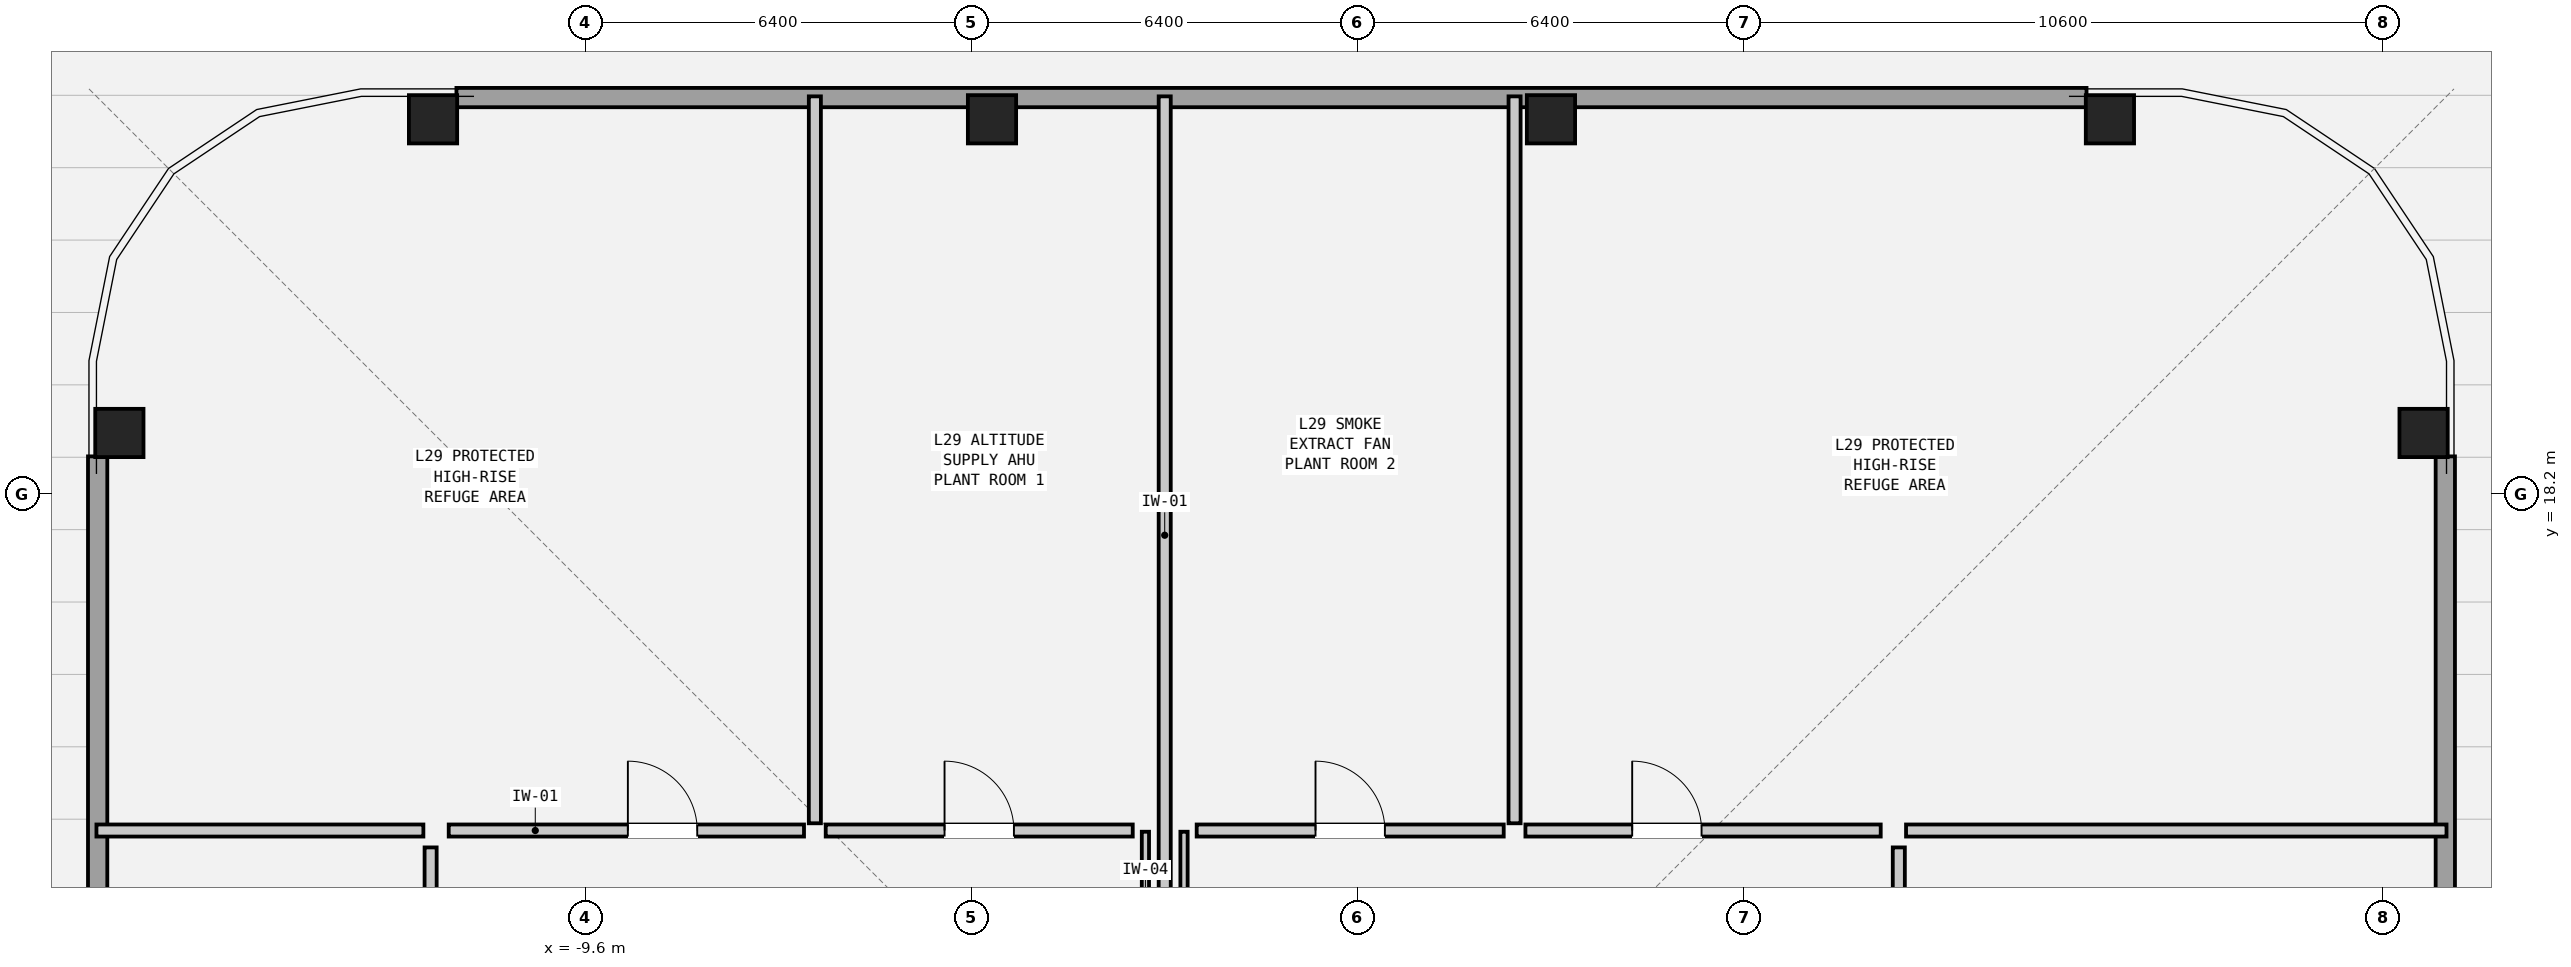
"""IFC4 building model, lengths in metres.
Left out: names, types, materials, properties, quantities, classifications, styles, units other than length and angle.
Written with IfcOpenShell. Run it as: python <this file> out.ifc"""

import sys

from ifc_helpers import new_model, si_unit, direction, frame, frame_2d, origin, origin_2d, place, context, subcontext, project, spatial, rectangle, hollow_rectangle, extrude, element, fill, save


model = new_model("IFC4")
c1 = context("Model", 3, precision=1e-05, world=origin(), true_north=direction((0.0, 1.0)))
c2 = subcontext(c1, "Body", "Model", "MODEL_VIEW")
j1 = project(units=[si_unit("LENGTHUNIT", "METRE"), si_unit("PLANEANGLEUNIT", "RADIAN")], contexts=[c1])
p1 = place(None, origin())
s1 = spatial("IfcSite", under=j1, at=p1, CompositionType="ELEMENT")
p2 = place(p1, origin())
s2 = spatial("IfcBuilding", under=s1, at=p2, CompositionType="ELEMENT")
p3 = place(p2, frame((0.0, 0.0, 101.25)))
s3 = spatial("IfcBuildingStorey", under=s2, at=p3, CompositionType="ELEMENT", Elevation=101.25)
for number, where, z_axis, x_axis in (
    (1, (20.87, 19.21, 0.0), (0.0, 0.0, 1.0), (0.0, 1.0, 0.0)),
    (2, (15.67, 24.41, 0.0), (0.0, 0.0, 1.0), (1.0, 0.0, 0.0)),
    (3, (6.403, 24.41, 0.0), (0.0, 0.0, 1.0), (1.0, 0.0, 0.0)),
    (4, (-2.863, 24.41, 0.0), (0.0, 0.0, 1.0), (1.0, 0.0, 0.0)),
    (5, (-12.13, 24.41, 0.0), (0.0, 0.0, 1.0), (1.0, 0.0, 0.0)),
    (6, (-17.33, 19.21, 0.0), (0.0, 0.0, 1.0), (0.0, 1.0, 0.0)),
):
    element("IfcColumn", number, at=place(p3, frame(where, z_axis=z_axis, x_axis=x_axis)), inside=s3, PredefinedType="COLUMN", context=c2, shape_type="SweptSolid", body=[
        extrude(hollow_rectangle(XDim=0.8, YDim=0.8, WallThickness=0.05, at=origin_2d()), origin(), (0.0, 0.0, 1.0), 3.6),
    ])
for number, where, z_axis, x_axis in (
    (7, (21.23, 18.822, 0.0), (0.0, 0.0, 1.0), (0.0, -1.0, 0.0)),
    (8, (-11.742, 24.77, 0.0), (0.0, 0.0, 1.0), (1.0, 0.0, 0.0)),
    (9, (-17.69, -8.202, 0.0), (0.0, 0.0, 1.0), (0.0, 1.0, 0.0)),
):
    element("IfcWall", number, at=place(p3, frame(where, z_axis=z_axis, x_axis=x_axis)), inside=s3, PredefinedType="SOLIDWALL", context=c2, shape_type="SweptSolid", body=[
        extrude(rectangle(XDim=27.024, YDim=0.32, at=frame_2d((13.512, 0.0))), origin(), (0.0, 0.0, 1.0), 2.082),
    ])
p4 = place(p3, frame((0.0, 10.24, 0.0), z_axis=(0.0, 0.0, 1.0), x_axis=(0.0, 1.0, 0.0)))
e10 = element("IfcWall", 10, at=p4, inside=s3, PredefinedType="PARTITIONING", context=c2, shape_type="SweptSolid", body=[
    extrude(rectangle(XDim=14.55, YDim=0.2, at=frame_2d((7.275, 0.0))), origin(), (0.0, 0.0, 1.0), 2.741),
])
for number, where, z_axis, x_axis in (
    (11, (-0.32, 10.24, 0.0), (0.0, 0.0, 1.0), (0.0, 1.0, 0.0)),
    (12, (0.32, 10.24, 0.0), (0.0, 0.0, 1.0), (0.0, 1.0, 0.0)),
):
    element("IfcWall", number, at=place(p3, frame(where, z_axis=z_axis, x_axis=x_axis)), inside=s3, PredefinedType="PARTITIONING", context=c2, shape_type="SweptSolid", body=[
        extrude(rectangle(XDim=2.36, YDim=0.12, at=frame_2d((1.18, 0.0))), origin(), (0.0, 0.0, 1.0), 2.741),
    ])
p5 = place(p3, frame((-11.87, 12.62, 0.0), z_axis=(0.0, 0.0, 1.0), x_axis=(1.0, 0.0, 0.0)))
e13 = element("IfcWall", 13, at=p5, inside=s3, PredefinedType="PARTITIONING", context=c2, shape_type="SweptSolid", body=[
    extrude(rectangle(XDim=5.89, YDim=0.2, at=frame_2d((2.945, 0.0))), origin(), (0.0, 0.0, 1.0), 3.22),
])
p6 = place(p5, frame((2.97, 0.0, 0.0)))
e14 = element("IfcOpeningElement", 14, at=p6, cuts=e13, PredefinedType="OPENING", context=c2, shape_type="SweptSolid", body=[
    extrude(rectangle(XDim=1.15, YDim=2.1, at=frame_2d((0.575, 1.05))), frame((0.0, 0.112, 0.0), z_axis=(0.0, -1.0, 0.0), x_axis=(1.0, 0.0, 0.0)), (0.0, 0.0, 1.0), 0.224),
])
p7 = place(p3, frame((-5.8, 12.74, 0.0), z_axis=(0.0, 0.0, 1.0), x_axis=(0.0, 1.0, 0.0)))
e15 = element("IfcWall", 15, at=p7, inside=s3, PredefinedType="PARTITIONING", context=c2, shape_type="SweptSolid", body=[
    extrude(rectangle(XDim=12.05, YDim=0.2, at=frame_2d((6.025, 0.0))), origin(), (0.0, 0.0, 1.0), 2.741),
])
p8 = place(p3, frame((-5.62, 12.62, 0.0), z_axis=(0.0, 0.0, 1.0), x_axis=(1.0, 0.0, 0.0)))
e16 = element("IfcWall", 16, at=p8, inside=s3, PredefinedType="PARTITIONING", context=c2, shape_type="SweptSolid", body=[
    extrude(rectangle(XDim=5.09, YDim=0.2, at=frame_2d((2.545, 0.0))), origin(), (0.0, 0.0, 1.0), 3.22),
])
p9 = place(p8, frame((1.97, 0.0, 0.0)))
e17 = element("IfcOpeningElement", 17, at=p9, cuts=e16, PredefinedType="OPENING", context=c2, shape_type="SweptSolid", body=[
    extrude(rectangle(XDim=1.15, YDim=2.1, at=frame_2d((0.575, 1.05))), frame((0.0, 0.112, 0.0), z_axis=(0.0, -1.0, 0.0), x_axis=(1.0, 0.0, 0.0)), (0.0, 0.0, 1.0), 0.224),
])
p10 = place(p3, frame((0.53, 12.62, 0.0), z_axis=(0.0, 0.0, 1.0), x_axis=(1.0, 0.0, 0.0)))
e18 = element("IfcWall", 18, at=p10, inside=s3, PredefinedType="PARTITIONING", context=c2, shape_type="SweptSolid", body=[
    extrude(rectangle(XDim=5.09, YDim=0.2, at=frame_2d((2.545, 0.0))), origin(), (0.0, 0.0, 1.0), 3.22),
])
p11 = place(p10, frame((1.97, 0.0, 0.0)))
e19 = element("IfcOpeningElement", 19, at=p11, cuts=e18, PredefinedType="OPENING", context=c2, shape_type="SweptSolid", body=[
    extrude(rectangle(XDim=1.15, YDim=2.1, at=frame_2d((0.575, 1.05))), frame((0.0, 0.112, 0.0), z_axis=(0.0, -1.0, 0.0), x_axis=(1.0, 0.0, 0.0)), (0.0, 0.0, 1.0), 0.224),
])
p12 = place(p3, frame((5.8, 12.74, 0.0), z_axis=(0.0, 0.0, 1.0), x_axis=(0.0, 1.0, 0.0)))
e20 = element("IfcWall", 20, at=p12, inside=s3, PredefinedType="PARTITIONING", context=c2, shape_type="SweptSolid", body=[
    extrude(rectangle(XDim=12.05, YDim=0.2, at=frame_2d((6.025, 0.0))), origin(), (0.0, 0.0, 1.0), 2.741),
])
p13 = place(p3, frame((5.98, 12.62, 0.0), z_axis=(0.0, 0.0, 1.0), x_axis=(1.0, 0.0, 0.0)))
e21 = element("IfcWall", 21, at=p13, inside=s3, PredefinedType="PARTITIONING", context=c2, shape_type="SweptSolid", body=[
    extrude(rectangle(XDim=5.89, YDim=0.2, at=frame_2d((2.945, 0.0))), origin(), (0.0, 0.0, 1.0), 3.22),
])
p14 = place(p13, frame((1.77, 0.0, 0.0)))
e22 = element("IfcOpeningElement", 22, at=p14, cuts=e21, PredefinedType="OPENING", context=c2, shape_type="SweptSolid", body=[
    extrude(rectangle(XDim=1.15, YDim=2.1, at=frame_2d((0.575, 1.05))), frame((0.0, 0.112, 0.0), z_axis=(0.0, -1.0, 0.0), x_axis=(1.0, 0.0, 0.0)), (0.0, 0.0, 1.0), 0.224),
])
p15 = place(p3, frame((-17.71, 12.62, 0.0), z_axis=(0.0, 0.0, 1.0), x_axis=(1.0, 0.0, 0.0)))
e23 = element("IfcWall", 23, at=p15, inside=s3, PredefinedType="PARTITIONING", context=c2, shape_type="SweptSolid", body=[
    extrude(rectangle(XDim=5.42, YDim=0.2, at=frame_2d((2.71, 0.0))), origin(), (0.0, 0.0, 1.0), 3.22),
])
p16 = place(p3, frame((12.29, 12.62, 0.0), z_axis=(0.0, 0.0, 1.0), x_axis=(1.0, 0.0, 0.0)))
e24 = element("IfcWall", 24, at=p16, inside=s3, PredefinedType="PARTITIONING", context=c2, shape_type="SweptSolid", body=[
    extrude(rectangle(XDim=8.96, YDim=0.2, at=frame_2d((4.48, 0.0))), origin(), (0.0, 0.0, 1.0), 3.22),
])
p17 = place(p3, frame((-12.17, 0.81, 0.0), z_axis=(0.0, 0.0, 1.0), x_axis=(0.0, 1.0, 0.0)))
e25 = element("IfcWall", 25, at=p17, inside=s3, PredefinedType="PARTITIONING", context=c2, shape_type="SweptSolid", body=[
    extrude(rectangle(XDim=11.53, YDim=0.2, at=frame_2d((5.765, 0.0))), origin(), (0.0, 0.0, 1.0), 3.22),
])
p18 = place(p17, frame((5.19, 0.0, 0.0)))
e26 = element("IfcOpeningElement", 26, at=p18, cuts=e25, PredefinedType="OPENING", context=c2, shape_type="SweptSolid", body=[
    extrude(rectangle(XDim=1.15, YDim=2.1, at=frame_2d((0.575, 1.05))), frame((0.0, 0.112, 0.0), z_axis=(0.0, -1.0, 0.0), x_axis=(1.0, 0.0, 0.0)), (0.0, 0.0, 1.0), 0.224),
])
p19 = place(p3, frame((12.17, 0.81, 0.0), z_axis=(0.0, 0.0, 1.0), x_axis=(0.0, 1.0, 0.0)))
e27 = element("IfcWall", 27, at=p19, inside=s3, PredefinedType="PARTITIONING", context=c2, shape_type="SweptSolid", body=[
    extrude(rectangle(XDim=11.53, YDim=0.2, at=frame_2d((5.765, 0.0))), origin(), (0.0, 0.0, 1.0), 3.22),
])
p20 = place(p19, frame((6.574, 0.0, 0.0)))
e28 = element("IfcOpeningElement", 28, at=p20, cuts=e27, PredefinedType="OPENING", context=c2, shape_type="SweptSolid", body=[
    extrude(rectangle(XDim=1.15, YDim=2.1, at=frame_2d((0.575, 1.05))), frame((0.0, 0.112, 0.0), z_axis=(0.0, -1.0, 0.0), x_axis=(1.0, 0.0, 0.0)), (0.0, 0.0, 1.0), 0.224),
])
p21 = place(p6, origin())
e29 = element("IfcDoor", 29, at=p21, inside=s3, OperationType="SINGLE_SWING_LEFT", PredefinedType="DOOR", context=c2, shape_type="SweptSolid", body=[
    extrude(rectangle(XDim=1.15, YDim=2.1, at=frame_2d((0.575, 1.05))), frame((0.0, 0.025, 0.0), z_axis=(0.0, -1.0, 0.0), x_axis=(1.0, 0.0, 0.0)), (0.0, 0.0, 1.0), 0.05),
])
fill(e14, e29)
p22 = place(p9, origin())
e30 = element("IfcDoor", 30, at=p22, inside=s3, OperationType="SINGLE_SWING_LEFT", PredefinedType="DOOR", context=c2, shape_type="SweptSolid", body=[
    extrude(rectangle(XDim=1.15, YDim=2.1, at=frame_2d((0.575, 1.05))), frame((0.0, 0.025, 0.0), z_axis=(0.0, -1.0, 0.0), x_axis=(1.0, 0.0, 0.0)), (0.0, 0.0, 1.0), 0.05),
])
fill(e17, e30)
p23 = place(p11, origin())
e31 = element("IfcDoor", 31, at=p23, inside=s3, OperationType="SINGLE_SWING_LEFT", PredefinedType="DOOR", context=c2, shape_type="SweptSolid", body=[
    extrude(rectangle(XDim=1.15, YDim=2.1, at=frame_2d((0.575, 1.05))), frame((0.0, 0.025, 0.0), z_axis=(0.0, -1.0, 0.0), x_axis=(1.0, 0.0, 0.0)), (0.0, 0.0, 1.0), 0.05),
])
fill(e19, e31)
p24 = place(p14, origin())
e32 = element("IfcDoor", 32, at=p24, inside=s3, OperationType="SINGLE_SWING_LEFT", PredefinedType="DOOR", context=c2, shape_type="SweptSolid", body=[
    extrude(rectangle(XDim=1.15, YDim=2.1, at=frame_2d((0.575, 1.05))), frame((0.0, 0.025, 0.0), z_axis=(0.0, -1.0, 0.0), x_axis=(1.0, 0.0, 0.0)), (0.0, 0.0, 1.0), 0.05),
])
fill(e22, e32)
save(model, sys.argv[1])
